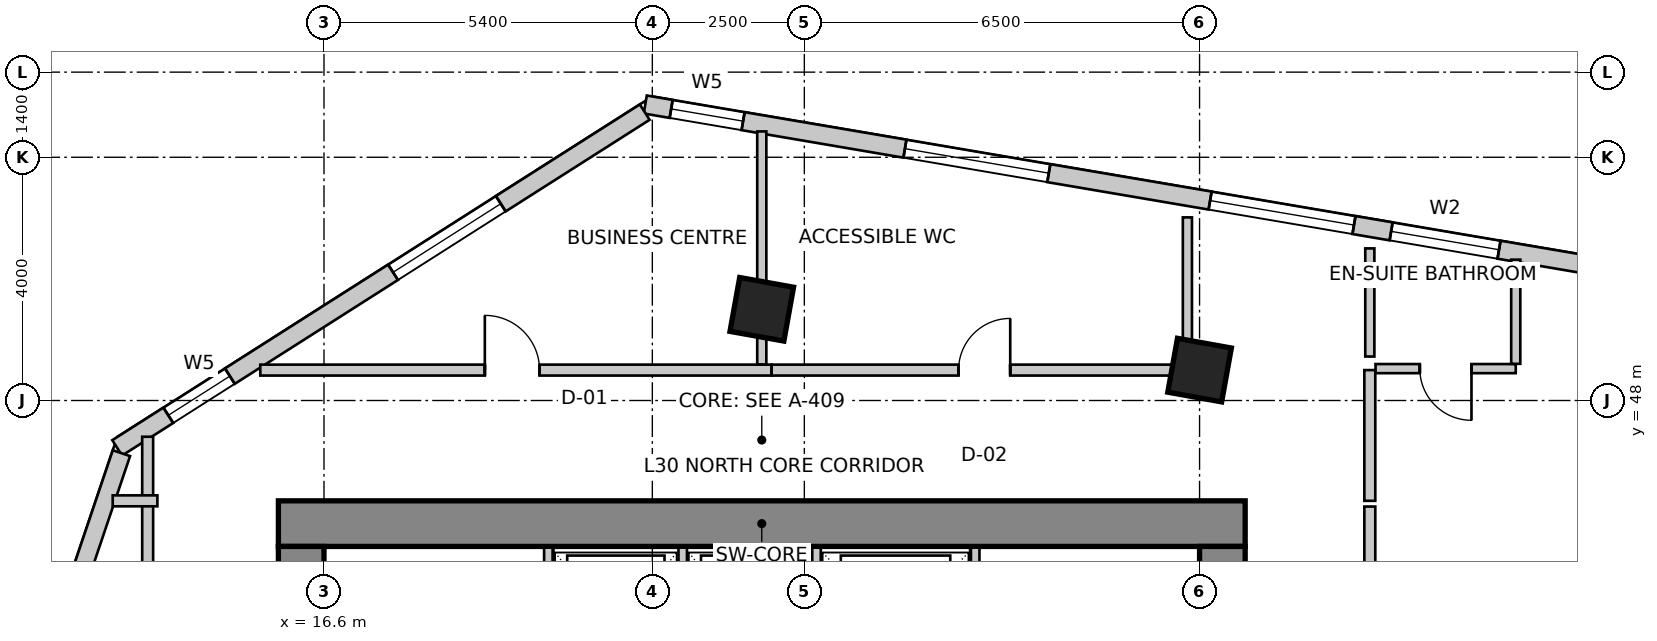
"""IFC4 building model, lengths in metres.
Left out: names, types, materials, properties, quantities, classifications, styles, units other than length and angle.
Written with IfcOpenShell. Run it as: python <this file> out.ifc"""

import sys

from ifc_helpers import new_model, si_unit, direction, frame, frame_2d, origin, origin_2d, place, context, subcontext, project, spatial, rectangle, extrude, source, transform, mapped, element, fill, save


model = new_model("IFC4")
c1 = context("Model", 3, precision=1e-05, world=origin(), true_north=direction((0.0, 1.0)))
c2 = subcontext(c1, "Body", "Model", "MODEL_VIEW")
j1 = project(units=[si_unit("LENGTHUNIT", "METRE"), si_unit("PLANEANGLEUNIT", "RADIAN")], contexts=[c1])
p1 = place(None, origin())
s1 = spatial("IfcSite", under=j1, at=p1, CompositionType="ELEMENT")
p2 = place(p1, origin())
s2 = spatial("IfcBuilding", under=s1, at=p2, CompositionType="ELEMENT")
p3 = place(p2, frame((0.0, 0.0, 125.0)))
s3 = spatial("IfcBuildingStorey", under=s2, at=p3, CompositionType="ELEMENT", Elevation=125.0)
p4 = place(p3, frame((15.85, 45.975, 0.0), z_axis=(0.0, 0.0, 1.0), x_axis=(1.0, 0.0, 0.0)))
e1 = element("IfcWall", 1, at=p4, inside=s3, PredefinedType="SHEAR", context=c2, shape_type="SweptSolid", body=[
    extrude(rectangle(XDim=15.9, YDim=0.75, at=frame_2d((7.95, 0.0))), origin(), (0.0, 0.0, 1.0), 3.6),
])
p5 = place(p3, frame((16.225, 34.2, 0.0), z_axis=(0.0, 0.0, 1.0), x_axis=(0.0, 1.0, 0.0)))
e2 = element("IfcWall", 2, at=p5, inside=s3, PredefinedType="SHEAR", context=c2, shape_type="SweptSolid", body=[
    extrude(rectangle(XDim=11.4, YDim=0.75, at=frame_2d((5.7, 0.0))), origin(), (0.0, 0.0, 1.0), 3.6),
])
m1 = source(origin(), c2, "Body", "SweptSolid", [
    extrude(rectangle(XDim=1.1, YDim=2.15, at=frame_2d((0.55, 1.075))), frame((0.0, 0.385, 0.0), z_axis=(0.0, -1.0, 0.0), x_axis=(1.0, 0.0, 0.0)), (0.0, 0.0, 1.0), 0.77),
])
p6 = place(p5, frame((7.15, 0.0, 0.0)))
e3 = element("IfcOpeningElement", 3, at=p6, cuts=e2, PredefinedType="OPENING", context=c2, shape_type="MappedRepresentation", body=[
    mapped(m1, transform((0.0, 0.0, 0.0), scale=1.0)),
])
p7 = place(p3, frame((31.375, 34.2, 0.0), z_axis=(0.0, 0.0, 1.0), x_axis=(0.0, 1.0, 0.0)))
e4 = element("IfcWall", 4, at=p7, inside=s3, PredefinedType="SHEAR", context=c2, shape_type="SweptSolid", body=[
    extrude(rectangle(XDim=11.4, YDim=0.75, at=frame_2d((5.7, 0.0))), origin(), (0.0, 0.0, 1.0), 3.6),
])
p8 = place(p7, frame((7.35, 0.0, 0.0)))
e5 = element("IfcOpeningElement", 5, at=p8, cuts=e4, PredefinedType="OPENING", context=c2, shape_type="MappedRepresentation", body=[
    mapped(m1, transform((0.0, 0.0, 0.0), scale=1.0)),
])
m2 = source(origin(), c2, "Body", "SweptSolid", [
    extrude(rectangle(XDim=0.9, YDim=0.9, at=origin_2d()), origin(), (0.0, 0.0, 1.0), 3.6),
])
for number, where, z_axis, x_axis in (
    (6, (23.8, 49.5, 0.0), (0.0, 0.0, 1.0), (0.984, -0.177, 0.0)),
    (7, (31.0, 48.5, 0.0), (0.0, 0.0, 1.0), (0.984, -0.177, 0.0)),
):
    element("IfcColumn", number, at=place(p3, frame(where, z_axis=z_axis, x_axis=x_axis)), inside=s3, PredefinedType="COLUMN", context=c2, shape_type="MappedRepresentation", body=[
        mapped(m2, transform((0.0, 0.0, 0.0), scale=1.0)),
    ])
p9 = place(p3, frame((53.561, 47.48, 0.0), z_axis=(0.0, 0.0, 1.0), x_axis=(-0.985845173895, 0.167658262868, 0.0)))
e8 = element("IfcWall", 8, at=p9, inside=s3, PredefinedType="SOLIDWALL", context=c2, shape_type="SweptSolid", body=[
    extrude(rectangle(XDim=32.132, YDim=0.3, at=frame_2d((16.066, 0.0))), origin(), (0.0, 0.0, 1.0), 3.35),
])
m3 = source(origin(), c2, "Body", "SweptSolid", [
    extrude(rectangle(XDim=2.4, YDim=2.2, at=frame_2d((1.2, 1.1))), frame((0.0, 0.16, 0.0), z_axis=(0.0, -1.0, 0.0), x_axis=(1.0, 0.0, 0.0)), (0.0, 0.0, 1.0), 0.32),
])
p10 = place(p9, frame((0.882, 0.0, 0.85)))
e9 = element("IfcOpeningElement", 9, at=p10, cuts=e8, PredefinedType="OPENING", context=c2, shape_type="MappedRepresentation", body=[
    mapped(m3, transform((0.0, 0.0, 0.0), scale=1.0)),
])
p11 = place(p9, frame((6.686, 0.0, 0.85)))
e10 = element("IfcOpeningElement", 10, at=p11, cuts=e8, PredefinedType="OPENING", context=c2, shape_type="MappedRepresentation", body=[
    mapped(m3, transform((0.0, 0.0, 0.0), scale=1.0)),
])
p12 = place(p9, frame((13.449, 0.0, 0.85)))
e11 = element("IfcOpeningElement", 11, at=p12, cuts=e8, PredefinedType="OPENING", context=c2, shape_type="MappedRepresentation", body=[
    mapped(m3, transform((0.0, 0.0, 0.0), scale=1.0)),
])
m4 = source(origin(), c2, "Body", "SweptSolid", [
    extrude(rectangle(XDim=1.8, YDim=2.1, at=frame_2d((0.9, 1.05))), frame((0.0, 0.16, 0.0), z_axis=(0.0, -1.0, 0.0), x_axis=(1.0, 0.0, 0.0)), (0.0, 0.0, 1.0), 0.32),
])
p13 = place(p9, frame((17.889, 0.0, 0.85)))
e12 = element("IfcOpeningElement", 12, at=p13, cuts=e8, PredefinedType="OPENING", context=c2, shape_type="MappedRepresentation", body=[
    mapped(m4, transform((0.0, 0.0, 0.0), scale=1.0)),
])
p14 = place(p9, frame((20.309, 0.0, 0.85)))
e13 = element("IfcOpeningElement", 13, at=p14, cuts=e8, PredefinedType="OPENING", context=c2, shape_type="MappedRepresentation", body=[
    mapped(m3, transform((0.0, 0.0, 0.0), scale=1.0)),
])
p15 = place(p9, frame((25.4, 0.0, 0.85)))
e14 = element("IfcOpeningElement", 14, at=p15, cuts=e8, PredefinedType="OPENING", context=c2, shape_type="MappedRepresentation", body=[
    mapped(m3, transform((0.0, 0.0, 0.0), scale=1.0)),
])
m5 = source(origin(), c2, "Body", "SweptSolid", [
    extrude(rectangle(XDim=1.2, YDim=1.6, at=frame_2d((0.6, 0.8))), frame((0.0, 0.16, 0.0), z_axis=(0.0, -1.0, 0.0), x_axis=(1.0, 0.0, 0.0)), (0.0, 0.0, 1.0), 0.32),
])
p16 = place(p9, frame((30.5, 0.0, 0.85)))
e15 = element("IfcOpeningElement", 15, at=p16, cuts=e8, PredefinedType="OPENING", context=c2, shape_type="MappedRepresentation", body=[
    mapped(m5, transform((0.0, 0.0, 0.0), scale=1.0)),
])
p17 = place(p3, frame((21.875, 52.742, 0.0), z_axis=(0.0, 0.0, 1.0), x_axis=(-0.843662465249, -0.536873956092, 0.0)))
e16 = element("IfcWall", 16, at=p17, inside=s3, PredefinedType="SOLIDWALL", context=c2, shape_type="SweptSolid", body=[
    extrude(rectangle(XDim=10.284, YDim=0.3, at=frame_2d((5.142, 0.0))), origin(), (0.0, 0.0, 1.0), 3.35),
])
m6 = source(origin(), c2, "Body", "SweptSolid", [
    extrude(rectangle(XDim=2.1, YDim=2.0, at=frame_2d((1.05, 1.0))), frame((0.0, 0.16, 0.0), z_axis=(0.0, -1.0, 0.0), x_axis=(1.0, 0.0, 0.0)), (0.0, 0.0, 1.0), 0.32),
])
p18 = place(p17, frame((2.806, 0.0, 0.85)))
e17 = element("IfcOpeningElement", 17, at=p18, cuts=e16, PredefinedType="OPENING", context=c2, shape_type="MappedRepresentation", body=[
    mapped(m6, transform((0.0, 0.0, 0.0), scale=1.0)),
])
p19 = place(p17, frame((8.087, 0.0, 0.85)))
e18 = element("IfcOpeningElement", 18, at=p19, cuts=e16, PredefinedType="OPENING", context=c2, shape_type="MappedRepresentation", body=[
    mapped(m5, transform((0.0, 0.0, 0.0), scale=1.0)),
])
p20 = place(p3, frame((13.269, 47.134, 0.0), z_axis=(0.0, 0.0, 1.0), x_axis=(-0.319929596295, -0.947441319246, 0.0)))
e19 = element("IfcWall", 19, at=p20, inside=s3, PredefinedType="SOLIDWALL", context=c2, shape_type="SweptSolid", body=[
    extrude(rectangle(XDim=16.134, YDim=0.3, at=frame_2d((8.067, 0.0))), origin(), (0.0, 0.0, 1.0), 3.35),
])
p21 = place(p20, frame((2.276, 0.0, 0.85)))
e20 = element("IfcOpeningElement", 20, at=p21, cuts=e19, PredefinedType="OPENING", context=c2, shape_type="MappedRepresentation", body=[
    mapped(m3, transform((0.0, 0.0, 0.0), scale=1.0)),
])
p22 = place(p20, frame((7.361, 0.0, 0.85)))
e21 = element("IfcOpeningElement", 21, at=p22, cuts=e19, PredefinedType="OPENING", context=c2, shape_type="MappedRepresentation", body=[
    mapped(m6, transform((0.0, 0.0, 0.0), scale=1.0)),
])
p23 = place(p20, frame((12.147, 0.0, 0.85)))
e22 = element("IfcOpeningElement", 22, at=p23, cuts=e19, PredefinedType="OPENING", context=c2, shape_type="MappedRepresentation", body=[
    mapped(m3, transform((0.0, 0.0, 0.0), scale=1.0)),
])
for number, where, z_axis, x_axis in (
    (23, (20.29, 43.28, 0.0), (0.0, 0.0, 1.0), (0.0, 1.0, 0.0)),
    (24, (27.31, 43.28, 0.0), (0.0, 0.0, 1.0), (0.0, 1.0, 0.0)),
):
    element("IfcWall", number, at=place(p3, frame(where, z_axis=z_axis, x_axis=x_axis)), inside=s3, PredefinedType="SOLIDWALL", context=c2, shape_type="SweptSolid", body=[
        extrude(rectangle(XDim=2.3, YDim=0.14, at=frame_2d((1.15, 0.0))), origin(), (0.0, 0.0, 1.0), 3.35),
    ])
for number, where, z_axis, x_axis in (
    (25, (22.5, 43.02, 0.0), (0.0, 0.0, 1.0), (0.0, 1.0, 0.0)),
    (26, (24.7, 43.02, 0.0), (0.0, 0.0, 1.0), (0.0, 1.0, 0.0)),
):
    element("IfcWall", number, at=place(p3, frame(where, z_axis=z_axis, x_axis=x_axis)), inside=s3, PredefinedType="SOLIDWALL", context=c2, shape_type="SweptSolid", body=[
        extrude(rectangle(XDim=2.56, YDim=0.14, at=frame_2d((1.28, 0.0))), origin(), (0.0, 0.0, 1.0), 3.35),
    ])
p24 = place(p3, frame((13.7, 33.544, 0.0), z_axis=(0.0, 0.0, 1.0), x_axis=(0.0, 1.0, 0.0)))
e27 = element("IfcWall", 27, at=p24, inside=s3, PredefinedType="PARTITIONING", context=c2, shape_type="SweptSolid", body=[
    extrude(rectangle(XDim=13.86, YDim=0.18, at=frame_2d((6.93, 0.0))), origin(), (0.0, 0.0, 1.0), 2.492),
])
m7 = source(origin(), c2, "Body", "SweptSolid", [
    extrude(rectangle(XDim=0.9, YDim=2.15, at=frame_2d((0.45, 1.075))), frame((0.0, 0.1, 0.0), z_axis=(0.0, -1.0, 0.0), x_axis=(1.0, 0.0, 0.0)), (0.0, 0.0, 1.0), 0.2),
])
p25 = place(p24, frame((4.253, 0.0, 0.0)))
e28 = element("IfcOpeningElement", 28, at=p25, cuts=e27, PredefinedType="OPENING", context=c2, shape_type="MappedRepresentation", body=[
    mapped(m7, transform((0.0, 0.0, 0.0), scale=1.0)),
])
p26 = place(p3, frame((13.86, 46.35, 0.0), z_axis=(0.0, 0.0, 1.0), x_axis=(-1.0, 0.0, 0.0)))
e29 = element("IfcWall", 29, at=p26, inside=s3, PredefinedType="PARTITIONING", context=c2, shape_type="SweptSolid", body=[
    extrude(rectangle(XDim=0.735, YDim=0.18, at=frame_2d((0.367, 0.0))), origin(), (0.0, 0.0, 1.0), 3.35),
])
p27 = place(p3, frame((15.552, 48.5, 0.0), z_axis=(0.0, 0.0, 1.0), x_axis=(1.0, 0.0, 0.0)))
e30 = element("IfcWall", 30, at=p27, inside=s3, PredefinedType="PARTITIONING", context=c2, shape_type="SweptSolid", body=[
    extrude(rectangle(XDim=8.407, YDim=0.18, at=frame_2d((4.204, 0.0))), origin(), (0.0, 0.0, 1.0), 2.935),
])
p28 = place(p27, frame((3.693, 0.0, 0.0)))
e31 = element("IfcOpeningElement", 31, at=p28, cuts=e30, PredefinedType="OPENING", context=c2, shape_type="MappedRepresentation", body=[
    mapped(m7, transform((0.0, 0.0, 0.0), scale=1.0)),
])
p29 = place(p3, frame((23.962, 48.5, 0.0), z_axis=(0.0, 0.0, 1.0), x_axis=(1.0, 0.0, 0.0)))
e32 = element("IfcWall", 32, at=p29, inside=s3, PredefinedType="PARTITIONING", context=c2, shape_type="SweptSolid", body=[
    extrude(rectangle(XDim=6.998, YDim=0.18, at=frame_2d((3.499, 0.0))), origin(), (0.0, 0.0, 1.0), 2.492),
])
m8 = source(origin(), c2, "Body", "SweptSolid", [
    extrude(rectangle(XDim=0.85, YDim=2.15, at=frame_2d((0.425, 1.075))), frame((0.0, 0.1, 0.0), z_axis=(0.0, -1.0, 0.0), x_axis=(1.0, 0.0, 0.0)), (0.0, 0.0, 1.0), 0.2),
])
p30 = place(p29, frame((3.074, 0.0, 0.0)))
e33 = element("IfcOpeningElement", 33, at=p30, cuts=e32, PredefinedType="OPENING", context=c2, shape_type="MappedRepresentation", body=[
    mapped(m8, transform((0.0, 0.0, 0.0), scale=1.0)),
])
p31 = place(p3, frame((33.8, 48.5, 0.0), z_axis=(0.0, 0.0, 1.0), x_axis=(0.0, -1.0, 0.0)))
e34 = element("IfcWall", 34, at=p31, inside=s3, PredefinedType="PARTITIONING", context=c2, shape_type="SweptSolid", body=[
    extrude(rectangle(XDim=2.15, YDim=0.18, at=frame_2d((1.075, 0.0))), origin(), (0.0, 0.0, 1.0), 2.492),
])
p32 = place(p3, frame((33.8, 46.256, 0.0), z_axis=(0.0, 0.0, 1.0), x_axis=(0.0, -1.0, 0.0)))
e35 = element("IfcWall", 35, at=p32, inside=s3, PredefinedType="PARTITIONING", context=c2, shape_type="SweptSolid", body=[
    extrude(rectangle(XDim=3.716, YDim=0.18, at=frame_2d((1.858, 0.0))), origin(), (0.0, 0.0, 1.0), 2.788),
])
p33 = place(p3, frame((23.8, 52.425, 0.0), z_axis=(0.0, 0.0, 1.0), x_axis=(0.0, -1.0, 0.0)))
e36 = element("IfcWall", 36, at=p33, inside=s3, PredefinedType="PARTITIONING", context=c2, shape_type="SweptSolid", body=[
    extrude(rectangle(XDim=3.831, YDim=0.15, at=frame_2d((1.916, 0.0))), origin(), (0.0, 0.0, 1.0), 2.492),
])
p34 = place(p3, frame((36.2, 48.524, 0.0), z_axis=(0.0, 0.0, 1.0), x_axis=(-1.0, 0.0, 0.0)))
e37 = element("IfcWall", 37, at=p34, inside=s3, PredefinedType="PARTITIONING", context=c2, shape_type="SweptSolid", body=[
    extrude(rectangle(XDim=2.306, YDim=0.15, at=frame_2d((1.153, 0.0))), origin(), (0.0, 0.0, 1.0), 3.35),
])
m9 = source(origin(), c2, "Body", "SweptSolid", [
    extrude(rectangle(XDim=0.85, YDim=2.15, at=frame_2d((0.425, 1.075))), frame((0.0, 0.085, 0.0), z_axis=(0.0, -1.0, 0.0), x_axis=(1.0, 0.0, 0.0)), (0.0, 0.0, 1.0), 0.17),
])
p35 = place(p34, frame((0.728, 0.0, 0.0)))
e38 = element("IfcOpeningElement", 38, at=p35, cuts=e37, PredefinedType="OPENING", context=c2, shape_type="MappedRepresentation", body=[
    mapped(m9, transform((0.0, 0.0, 0.0), scale=1.0)),
])
p36 = place(p3, frame((36.2, 50.316, 0.0), z_axis=(0.0, 0.0, 1.0), x_axis=(0.0, -1.0, 0.0)))
e39 = element("IfcWall", 39, at=p36, inside=s3, PredefinedType="PARTITIONING", context=c2, shape_type="SweptSolid", body=[
    extrude(rectangle(XDim=1.713, YDim=0.15, at=frame_2d((0.856, 0.0))), origin(), (0.0, 0.0, 1.0), 3.35),
])
p37 = place(p3, frame((30.8, 51.011, 0.0), z_axis=(0.0, 0.0, 1.0), x_axis=(0.0, -1.0, 0.0)))
e40 = element("IfcWall", 40, at=p37, inside=s3, PredefinedType="PARTITIONING", context=c2, shape_type="SweptSolid", body=[
    extrude(rectangle(XDim=2.292, YDim=0.15, at=frame_2d((1.146, 0.0))), origin(), (0.0, 0.0, 1.0), 3.35),
])
p38 = place(p3, frame((33.8, 48.723, 0.0), z_axis=(0.0, 0.0, 1.0), x_axis=(0.0, 1.0, 0.0)))
e41 = element("IfcWall", 41, at=p38, inside=s3, PredefinedType="PARTITIONING", context=c2, shape_type="SweptSolid", body=[
    extrude(rectangle(XDim=1.778, YDim=0.15, at=frame_2d((0.889, 0.0))), origin(), (0.0, 0.0, 1.0), 3.35),
])
m10 = source(origin(), c2, "Body", "SweptSolid", [
    extrude(rectangle(XDim=1.8, YDim=2.1, at=frame_2d((0.9, 1.05))), frame((0.0, -0.015, 0.0), z_axis=(0.0, -1.0, 0.0), x_axis=(1.0, 0.0, 0.0)), (0.0, 0.0, 1.0), 0.06),
])
p39 = place(p13, origin())
e42 = element("IfcWindow", 42, at=p39, inside=s3, PartitioningType="SINGLE_PANEL", PredefinedType="WINDOW", context=c2, shape_type="MappedRepresentation", body=[
    mapped(m10, transform((0.0, 0.0, 0.0), scale=1.0)),
])
fill(e12, e42)
m11 = source(origin(), c2, "Body", "SweptSolid", [
    extrude(rectangle(XDim=2.4, YDim=2.2, at=frame_2d((1.2, 1.1))), frame((0.0, -0.015, 0.0), z_axis=(0.0, -1.0, 0.0), x_axis=(1.0, 0.0, 0.0)), (0.0, 0.0, 1.0), 0.06),
])
p40 = place(p14, origin())
e43 = element("IfcWindow", 43, at=p40, inside=s3, PartitioningType="SINGLE_PANEL", PredefinedType="WINDOW", context=c2, shape_type="MappedRepresentation", body=[
    mapped(m11, transform((0.0, 0.0, 0.0), scale=1.0)),
])
fill(e13, e43)
p41 = place(p15, origin())
e44 = element("IfcWindow", 44, at=p41, inside=s3, PartitioningType="SINGLE_PANEL", PredefinedType="WINDOW", context=c2, shape_type="MappedRepresentation", body=[
    mapped(m11, transform((0.0, 0.0, 0.0), scale=1.0)),
])
fill(e14, e44)
m12 = source(origin(), c2, "Body", "SweptSolid", [
    extrude(rectangle(XDim=1.2, YDim=1.6, at=frame_2d((0.6, 0.8))), frame((0.0, -0.015, 0.0), z_axis=(0.0, -1.0, 0.0), x_axis=(1.0, 0.0, 0.0)), (0.0, 0.0, 1.0), 0.06),
])
p42 = place(p16, origin())
e45 = element("IfcWindow", 45, at=p42, inside=s3, PartitioningType="SINGLE_PANEL", PredefinedType="WINDOW", context=c2, shape_type="MappedRepresentation", body=[
    mapped(m12, transform((0.0, 0.0, 0.0), scale=1.0)),
])
fill(e15, e45)
m13 = source(origin(), c2, "Body", "SweptSolid", [
    extrude(rectangle(XDim=2.1, YDim=2.0, at=frame_2d((1.05, 1.0))), frame((0.0, -0.015, 0.0), z_axis=(0.0, -1.0, 0.0), x_axis=(1.0, 0.0, 0.0)), (0.0, 0.0, 1.0), 0.06),
])
p43 = place(p18, origin())
e46 = element("IfcWindow", 46, at=p43, inside=s3, PartitioningType="SINGLE_PANEL", PredefinedType="WINDOW", context=c2, shape_type="MappedRepresentation", body=[
    mapped(m13, transform((0.0, 0.0, 0.0), scale=1.0)),
])
fill(e17, e46)
p44 = place(p19, origin())
e47 = element("IfcWindow", 47, at=p44, inside=s3, PartitioningType="SINGLE_PANEL", PredefinedType="WINDOW", context=c2, shape_type="MappedRepresentation", body=[
    mapped(m12, transform((0.0, 0.0, 0.0), scale=1.0)),
])
fill(e18, e47)
m14 = source(origin(), c2, "Body", "SweptSolid", [
    extrude(rectangle(XDim=0.9, YDim=2.15, at=frame_2d((0.45, 1.075))), frame((0.0, 0.025, 0.0), z_axis=(0.0, -1.0, 0.0), x_axis=(1.0, 0.0, 0.0)), (0.0, 0.0, 1.0), 0.05),
])
p45 = place(p28, origin())
e48 = element("IfcDoor", 48, at=p45, inside=s3, OperationType="SINGLE_SWING_LEFT", PredefinedType="DOOR", context=c2, shape_type="MappedRepresentation", body=[
    mapped(m14, transform((0.0, 0.0, 0.0), scale=1.0)),
])
fill(e31, e48)
m15 = source(origin(), c2, "Body", "SweptSolid", [
    extrude(rectangle(XDim=0.85, YDim=2.15, at=frame_2d((0.425, 1.075))), frame((0.0, 0.025, 0.0), z_axis=(0.0, -1.0, 0.0), x_axis=(1.0, 0.0, 0.0)), (0.0, 0.0, 1.0), 0.05),
])
p46 = place(p30, origin())
e49 = element("IfcDoor", 49, at=p46, inside=s3, OperationType="SINGLE_SWING_RIGHT", PredefinedType="DOOR", context=c2, shape_type="MappedRepresentation", body=[
    mapped(m15, transform((0.0, 0.0, 0.0), scale=1.0)),
])
fill(e33, e49)
p47 = place(p35, origin())
e50 = element("IfcDoor", 50, at=p47, inside=s3, OperationType="SINGLE_SWING_LEFT", PredefinedType="DOOR", context=c2, shape_type="MappedRepresentation", body=[
    mapped(m15, transform((0.0, 0.0, 0.0), scale=1.0)),
])
fill(e38, e50)
save(model, sys.argv[1])
